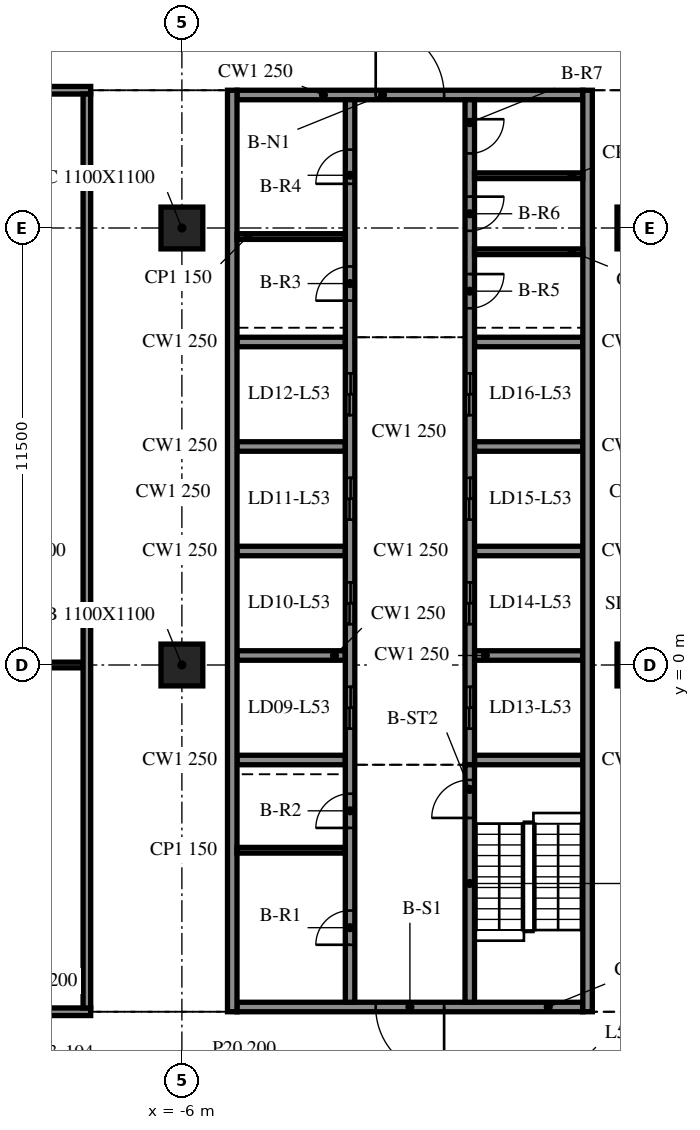
"""IFC4 building model, lengths in metres.
Left out: names, types, materials, properties, quantities, classifications, styles, units other than length and angle.
Written with IfcOpenShell. Run it as: python <this file> out.ifc"""

import sys

from ifc_helpers import new_model, si_unit, direction, frame, frame_2d, origin, origin_2d, place, context, subcontext, project, spatial, rectangle, extrude, element, fill, save


model = new_model("IFC4")
c1 = context("Model", 3, precision=1e-05, world=origin(), true_north=direction((0.0, 1.0)))
c2 = subcontext(c1, "Body", "Model", "MODEL_VIEW")
j1 = project(units=[si_unit("LENGTHUNIT", "METRE"), si_unit("PLANEANGLEUNIT", "RADIAN")], contexts=[c1])
p1 = place(None, origin())
s1 = spatial("IfcSite", under=j1, at=p1, CompositionType="ELEMENT")
p2 = place(p1, origin())
s2 = spatial("IfcBuilding", under=s1, at=p2, CompositionType="ELEMENT")
p3 = place(p2, frame((0.0, 0.0, 220.5)))
s3 = spatial("IfcBuildingStorey", under=s2, at=p3, CompositionType="ELEMENT", Elevation=220.5)
for number, where, z_axis, x_axis in (
    (1, (-6.0, 0.0, -0.34), (0.0, 0.0, 1.0), (1.0, 0.0, 0.0)),
    (2, (-6.0, 11.5, -0.34), (0.0, 0.0, 1.0), (1.0, 0.0, 0.0)),
    (3, (6.0, 0.0, -0.34), (0.0, 0.0, 1.0), (1.0, 0.0, 0.0)),
    (4, (6.0, 11.5, -0.34), (0.0, 0.0, 1.0), (1.0, 0.0, 0.0)),
):
    element("IfcColumn", number, at=place(p3, frame(where, z_axis=z_axis, x_axis=x_axis)), inside=s3, PredefinedType="COLUMN", context=c2, shape_type="SweptSolid", body=[
        extrude(rectangle(XDim=1.1, YDim=1.1, at=origin_2d()), origin(), (0.0, 0.0, 1.0), 3.74),
    ])
for number, where, z_axis, x_axis in (
    (5, (-4.675, 15.125, 0.0), (0.0, 0.0, 1.0), (0.0, -1.0, 0.0)),
    (6, (4.675, -9.125, 0.0), (0.0, 0.0, 1.0), (0.0, 1.0, 0.0)),
):
    element("IfcWall", number, at=place(p3, frame(where, z_axis=z_axis, x_axis=x_axis)), inside=s3, PredefinedType="SOLIDWALL", context=c2, shape_type="SweptSolid", body=[
        extrude(rectangle(XDim=24.25, YDim=0.25, at=frame_2d((12.125, 0.0))), origin(), (0.0, 0.0, 1.0), 3.4),
    ])
p4 = place(p3, frame((4.55, -9.0, 0.0), z_axis=(0.0, 0.0, 1.0), x_axis=(-1.0, 0.0, 0.0)))
e7 = element("IfcWall", 7, at=p4, inside=s3, PredefinedType="SOLIDWALL", context=c2, shape_type="SweptSolid", body=[
    extrude(rectangle(XDim=9.1, YDim=0.25, at=frame_2d((4.55, 0.0))), origin(), (0.0, 0.0, 1.0), 3.4),
])
p5 = place(p4, frame((3.65, 0.0, 0.0)))
e8 = element("IfcOpeningElement", 8, at=p5, cuts=e7, PredefinedType="OPENING", context=c2, shape_type="SweptSolid", body=[
    extrude(rectangle(XDim=1.8, YDim=2.1, at=frame_2d((0.9, 1.05))), frame((0.0, 0.135, 0.0), z_axis=(0.0, -1.0, 0.0), x_axis=(1.0, 0.0, 0.0)), (0.0, 0.0, 1.0), 0.27),
])
p6 = place(p3, frame((-4.55, 15.0, 0.0), z_axis=(0.0, 0.0, 1.0), x_axis=(1.0, 0.0, 0.0)))
e9 = element("IfcWall", 9, at=p6, inside=s3, PredefinedType="SOLIDWALL", context=c2, shape_type="SweptSolid", body=[
    extrude(rectangle(XDim=9.1, YDim=0.25, at=frame_2d((4.55, 0.0))), origin(), (0.0, 0.0, 1.0), 3.4),
])
p7 = place(p6, frame((3.65, 0.0, 0.0)))
e10 = element("IfcOpeningElement", 10, at=p7, cuts=e9, PredefinedType="OPENING", context=c2, shape_type="SweptSolid", body=[
    extrude(rectangle(XDim=1.8, YDim=2.1, at=frame_2d((0.9, 1.05))), frame((0.0, 0.135, 0.0), z_axis=(0.0, -1.0, 0.0), x_axis=(1.0, 0.0, 0.0)), (0.0, 0.0, 1.0), 0.27),
])
p8 = place(p3, frame((-1.575, -8.875, 0.0), z_axis=(0.0, 0.0, 1.0), x_axis=(0.0, 1.0, 0.0)))
e11 = element("IfcWall", 11, at=p8, inside=s3, PredefinedType="SOLIDWALL", context=c2, shape_type="SweptSolid", body=[
    extrude(rectangle(XDim=23.75, YDim=0.25, at=frame_2d((11.875, 0.0))), origin(), (0.0, 0.0, 1.0), 3.4),
])
p9 = place(p8, frame((7.2, 0.0, 0.0)))
e12 = element("IfcOpeningElement", 12, at=p9, cuts=e11, PredefinedType="OPENING", context=c2, shape_type="SweptSolid", body=[
    extrude(rectangle(XDim=1.1, YDim=2.1, at=frame_2d((0.55, 1.05))), frame((0.0, 0.135, 0.0), z_axis=(0.0, -1.0, 0.0), x_axis=(1.0, 0.0, 0.0)), (0.0, 0.0, 1.0), 0.27),
])
p10 = place(p8, frame((9.95, 0.0, 0.0)))
e13 = element("IfcOpeningElement", 13, at=p10, cuts=e11, PredefinedType="OPENING", context=c2, shape_type="SweptSolid", body=[
    extrude(rectangle(XDim=1.1, YDim=2.1, at=frame_2d((0.55, 1.05))), frame((0.0, 0.135, 0.0), z_axis=(0.0, -1.0, 0.0), x_axis=(1.0, 0.0, 0.0)), (0.0, 0.0, 1.0), 0.27),
])
p11 = place(p8, frame((12.7, 0.0, 0.0)))
e14 = element("IfcOpeningElement", 14, at=p11, cuts=e11, PredefinedType="OPENING", context=c2, shape_type="SweptSolid", body=[
    extrude(rectangle(XDim=1.1, YDim=2.1, at=frame_2d((0.55, 1.05))), frame((0.0, 0.135, 0.0), z_axis=(0.0, -1.0, 0.0), x_axis=(1.0, 0.0, 0.0)), (0.0, 0.0, 1.0), 0.27),
])
p12 = place(p8, frame((15.45, 0.0, 0.0)))
e15 = element("IfcOpeningElement", 15, at=p12, cuts=e11, PredefinedType="OPENING", context=c2, shape_type="SweptSolid", body=[
    extrude(rectangle(XDim=1.1, YDim=2.1, at=frame_2d((0.55, 1.05))), frame((0.0, 0.135, 0.0), z_axis=(0.0, -1.0, 0.0), x_axis=(1.0, 0.0, 0.0)), (0.0, 0.0, 1.0), 0.27),
])
p13 = place(p8, frame((1.512, 0.0, 0.0)))
e16 = element("IfcOpeningElement", 16, at=p13, cuts=e11, PredefinedType="OPENING", context=c2, shape_type="SweptSolid", body=[
    extrude(rectangle(XDim=0.9, YDim=2.1, at=frame_2d((0.45, 1.05))), frame((0.0, 0.135, 0.0), z_axis=(0.0, -1.0, 0.0), x_axis=(1.0, 0.0, 0.0)), (0.0, 0.0, 1.0), 0.27),
])
p14 = place(p8, frame((4.587, 0.0, 0.0)))
e17 = element("IfcOpeningElement", 17, at=p14, cuts=e11, PredefinedType="OPENING", context=c2, shape_type="SweptSolid", body=[
    extrude(rectangle(XDim=0.9, YDim=2.1, at=frame_2d((0.45, 1.05))), frame((0.0, 0.135, 0.0), z_axis=(0.0, -1.0, 0.0), x_axis=(1.0, 0.0, 0.0)), (0.0, 0.0, 1.0), 0.27),
])
p15 = place(p8, frame((18.462, 0.0, 0.0)))
e18 = element("IfcOpeningElement", 18, at=p15, cuts=e11, PredefinedType="OPENING", context=c2, shape_type="SweptSolid", body=[
    extrude(rectangle(XDim=0.9, YDim=2.1, at=frame_2d((0.45, 1.05))), frame((0.0, 0.135, 0.0), z_axis=(0.0, -1.0, 0.0), x_axis=(1.0, 0.0, 0.0)), (0.0, 0.0, 1.0), 0.27),
])
p16 = place(p8, frame((21.538, 0.0, 0.0)))
e19 = element("IfcOpeningElement", 19, at=p16, cuts=e11, PredefinedType="OPENING", context=c2, shape_type="SweptSolid", body=[
    extrude(rectangle(XDim=0.9, YDim=2.1, at=frame_2d((0.45, 1.05))), frame((0.0, 0.135, 0.0), z_axis=(0.0, -1.0, 0.0), x_axis=(1.0, 0.0, 0.0)), (0.0, 0.0, 1.0), 0.27),
])
p17 = place(p3, frame((1.575, -8.875, 0.0), z_axis=(0.0, 0.0, 1.0), x_axis=(0.0, 1.0, 0.0)))
e20 = element("IfcWall", 20, at=p17, inside=s3, PredefinedType="SOLIDWALL", context=c2, shape_type="SweptSolid", body=[
    extrude(rectangle(XDim=6.25, YDim=0.25, at=frame_2d((3.125, 0.0))), origin(), (0.0, 0.0, 1.0), 3.4),
])
p18 = place(p17, frame((4.85, 0.0, 0.0)))
e21 = element("IfcOpeningElement", 21, at=p18, cuts=e20, PredefinedType="OPENING", context=c2, shape_type="SweptSolid", body=[
    extrude(rectangle(XDim=1.0, YDim=2.1, at=frame_2d((0.5, 1.05))), frame((0.0, 0.135, 0.0), z_axis=(0.0, -1.0, 0.0), x_axis=(1.0, 0.0, 0.0)), (0.0, 0.0, 1.0), 0.27),
])
p19 = place(p3, frame((1.575, 14.875, 0.0), z_axis=(0.0, 0.0, 1.0), x_axis=(0.0, -1.0, 0.0)))
e22 = element("IfcWall", 22, at=p19, inside=s3, PredefinedType="SOLIDWALL", context=c2, shape_type="SweptSolid", body=[
    extrude(rectangle(XDim=17.5, YDim=0.25, at=frame_2d((8.75, 0.0))), origin(), (0.0, 0.0, 1.0), 3.4),
])
p20 = place(p19, frame((15.45, 0.0, 0.0)))
e23 = element("IfcOpeningElement", 23, at=p20, cuts=e22, PredefinedType="OPENING", context=c2, shape_type="SweptSolid", body=[
    extrude(rectangle(XDim=1.1, YDim=2.1, at=frame_2d((0.55, 1.05))), frame((0.0, 0.135, 0.0), z_axis=(0.0, -1.0, 0.0), x_axis=(1.0, 0.0, 0.0)), (0.0, 0.0, 1.0), 0.27),
])
p21 = place(p19, frame((12.7, 0.0, 0.0)))
e24 = element("IfcOpeningElement", 24, at=p21, cuts=e22, PredefinedType="OPENING", context=c2, shape_type="SweptSolid", body=[
    extrude(rectangle(XDim=1.1, YDim=2.1, at=frame_2d((0.55, 1.05))), frame((0.0, 0.135, 0.0), z_axis=(0.0, -1.0, 0.0), x_axis=(1.0, 0.0, 0.0)), (0.0, 0.0, 1.0), 0.27),
])
p22 = place(p19, frame((9.95, 0.0, 0.0)))
e25 = element("IfcOpeningElement", 25, at=p22, cuts=e22, PredefinedType="OPENING", context=c2, shape_type="SweptSolid", body=[
    extrude(rectangle(XDim=1.1, YDim=2.1, at=frame_2d((0.55, 1.05))), frame((0.0, 0.135, 0.0), z_axis=(0.0, -1.0, 0.0), x_axis=(1.0, 0.0, 0.0)), (0.0, 0.0, 1.0), 0.27),
])
p23 = place(p19, frame((7.2, 0.0, 0.0)))
e26 = element("IfcOpeningElement", 26, at=p23, cuts=e22, PredefinedType="OPENING", context=c2, shape_type="SweptSolid", body=[
    extrude(rectangle(XDim=1.1, YDim=2.1, at=frame_2d((0.55, 1.05))), frame((0.0, 0.135, 0.0), z_axis=(0.0, -1.0, 0.0), x_axis=(1.0, 0.0, 0.0)), (0.0, 0.0, 1.0), 0.27),
])
p24 = place(p19, frame((4.587, 0.0, 0.0)))
e27 = element("IfcOpeningElement", 27, at=p24, cuts=e22, PredefinedType="OPENING", context=c2, shape_type="SweptSolid", body=[
    extrude(rectangle(XDim=0.9, YDim=2.1, at=frame_2d((0.45, 1.05))), frame((0.0, 0.135, 0.0), z_axis=(0.0, -1.0, 0.0), x_axis=(1.0, 0.0, 0.0)), (0.0, 0.0, 1.0), 0.27),
])
p25 = place(p19, frame((2.55, 0.0, 0.0)))
e28 = element("IfcOpeningElement", 28, at=p25, cuts=e22, PredefinedType="OPENING", context=c2, shape_type="SweptSolid", body=[
    extrude(rectangle(XDim=0.9, YDim=2.1, at=frame_2d((0.45, 1.05))), frame((0.0, 0.135, 0.0), z_axis=(0.0, -1.0, 0.0), x_axis=(1.0, 0.0, 0.0)), (0.0, 0.0, 1.0), 0.27),
])
p26 = place(p19, frame((0.512, 0.0, 0.0)))
e29 = element("IfcOpeningElement", 29, at=p26, cuts=e22, PredefinedType="OPENING", context=c2, shape_type="SweptSolid", body=[
    extrude(rectangle(XDim=0.9, YDim=2.1, at=frame_2d((0.45, 1.05))), frame((0.0, 0.135, 0.0), z_axis=(0.0, -1.0, 0.0), x_axis=(1.0, 0.0, 0.0)), (0.0, 0.0, 1.0), 0.27),
])
for number, where, z_axis, x_axis in (
    (30, (-4.55, -2.5, 0.0), (0.0, 0.0, 1.0), (1.0, 0.0, 0.0)),
    (31, (-4.55, 0.25, 0.0), (0.0, 0.0, 1.0), (1.0, 0.0, 0.0)),
    (32, (-4.55, 3.0, 0.0), (0.0, 0.0, 1.0), (1.0, 0.0, 0.0)),
    (33, (-4.55, 5.75, 0.0), (0.0, 0.0, 1.0), (1.0, 0.0, 0.0)),
    (34, (-4.55, 8.5, 0.0), (0.0, 0.0, 1.0), (1.0, 0.0, 0.0)),
    (35, (1.7, -2.5, 0.0), (0.0, 0.0, 1.0), (1.0, 0.0, 0.0)),
    (36, (1.7, 0.25, 0.0), (0.0, 0.0, 1.0), (1.0, 0.0, 0.0)),
    (37, (1.7, 3.0, 0.0), (0.0, 0.0, 1.0), (1.0, 0.0, 0.0)),
    (38, (1.7, 5.75, 0.0), (0.0, 0.0, 1.0), (1.0, 0.0, 0.0)),
    (39, (1.7, 8.5, 0.0), (0.0, 0.0, 1.0), (1.0, 0.0, 0.0)),
):
    element("IfcWall", number, at=place(p3, frame(where, z_axis=z_axis, x_axis=x_axis)), inside=s3, PredefinedType="SOLIDWALL", context=c2, shape_type="SweptSolid", body=[
        extrude(rectangle(XDim=2.85, YDim=0.25, at=frame_2d((1.425, 0.0))), origin(), (0.0, 0.0, 1.0), 3.4),
    ])
for number, where, z_axis, x_axis in (
    (40, (-4.55, -4.875, 0.0), (0.0, 0.0, 1.0), (1.0, 0.0, 0.0)),
    (41, (-4.55, 11.275, 0.0), (0.0, 0.0, 1.0), (1.0, 0.0, 0.0)),
    (42, (1.7, 10.875, 0.0), (0.0, 0.0, 1.0), (1.0, 0.0, 0.0)),
    (43, (1.7, 12.875, 0.0), (0.0, 0.0, 1.0), (1.0, 0.0, 0.0)),
):
    element("IfcWall", number, at=place(p3, frame(where, z_axis=z_axis, x_axis=x_axis)), inside=s3, PredefinedType="PARTITIONING", context=c2, shape_type="SweptSolid", body=[
        extrude(rectangle(XDim=2.85, YDim=0.15, at=frame_2d((1.425, 0.0))), origin(), (0.0, 0.0, 1.0), 3.4),
    ])
p27 = place(p3, frame((-15.7, -9.125, 0.0), z_axis=(0.0, 0.0, 1.0), x_axis=(1.0, 0.0, 0.0)))
e44 = element("IfcWall", 44, at=p27, inside=s3, PredefinedType="PARTITIONING", context=c2, shape_type="SweptSolid", body=[
    extrude(rectangle(XDim=7.3, YDim=0.2, at=frame_2d((3.65, 0.0))), origin(), (0.0, 0.0, 1.0), 3.4),
])
p28 = place(p27, frame((3.1, 0.0, 0.0)))
e45 = element("IfcOpeningElement", 45, at=p28, cuts=e44, PredefinedType="OPENING", context=c2, shape_type="SweptSolid", body=[
    extrude(rectangle(XDim=0.9, YDim=2.1, at=frame_2d((0.45, 1.05))), frame((0.0, 0.11, 0.0), z_axis=(0.0, -1.0, 0.0), x_axis=(1.0, 0.0, 0.0)), (0.0, 0.0, 1.0), 0.22),
])
p29 = place(p3, frame((-15.5, 0.0, 0.0), z_axis=(0.0, 0.0, 1.0), x_axis=(1.0, 0.0, 0.0)))
e46 = element("IfcWall", 46, at=p29, inside=s3, PredefinedType="PARTITIONING", context=c2, shape_type="SweptSolid", body=[
    extrude(rectangle(XDim=6.9, YDim=0.15, at=frame_2d((3.45, 0.0))), origin(), (0.0, 0.0, 1.0), 3.4),
])
p30 = place(p3, frame((-15.7, 15.125, 0.0), z_axis=(0.0, 0.0, 1.0), x_axis=(1.0, 0.0, 0.0)))
e47 = element("IfcWall", 47, at=p30, inside=s3, PredefinedType="PARTITIONING", context=c2, shape_type="SweptSolid", body=[
    extrude(rectangle(XDim=7.3, YDim=0.2, at=frame_2d((3.65, 0.0))), origin(), (0.0, 0.0, 1.0), 3.4),
])
p31 = place(p3, frame((-8.5, -9.025, 0.0), z_axis=(0.0, 0.0, 1.0), x_axis=(0.0, 1.0, 0.0)))
e48 = element("IfcWall", 48, at=p31, inside=s3, PredefinedType="PARTITIONING", context=c2, shape_type="SweptSolid", body=[
    extrude(rectangle(XDim=24.05, YDim=0.2, at=frame_2d((12.025, 0.0))), origin(), (0.0, 0.0, 1.0), 3.4),
])
p32 = place(p5, origin())
e49 = element("IfcDoor", 49, at=p32, inside=s3, OperationType="DOUBLE_DOOR_SINGLE_SWING", PredefinedType="DOOR", context=c2, shape_type="SweptSolid", body=[
    extrude(rectangle(XDim=1.8, YDim=2.1, at=frame_2d((0.9, 1.05))), frame((0.0, 0.025, 0.0), z_axis=(0.0, -1.0, 0.0), x_axis=(1.0, 0.0, 0.0)), (0.0, 0.0, 1.0), 0.05),
])
fill(e8, e49)
p33 = place(p7, origin())
e50 = element("IfcDoor", 50, at=p33, inside=s3, OperationType="DOUBLE_DOOR_SINGLE_SWING", PredefinedType="DOOR", context=c2, shape_type="SweptSolid", body=[
    extrude(rectangle(XDim=1.8, YDim=2.1, at=frame_2d((0.9, 1.05))), frame((0.0, 0.025, 0.0), z_axis=(0.0, -1.0, 0.0), x_axis=(1.0, 0.0, 0.0)), (0.0, 0.0, 1.0), 0.05),
])
fill(e10, e50)
p34 = place(p20, origin())
e51 = element("IfcDoor", 51, at=p34, inside=s3, OperationType="DOUBLE_DOOR_SLIDING", PredefinedType="DOOR", context=c2, shape_type="SweptSolid", body=[
    extrude(rectangle(XDim=1.1, YDim=2.1, at=frame_2d((0.55, 1.05))), frame((0.0, 0.025, 0.0), z_axis=(0.0, -1.0, 0.0), x_axis=(1.0, 0.0, 0.0)), (0.0, 0.0, 1.0), 0.05),
])
fill(e23, e51)
p35 = place(p21, origin())
e52 = element("IfcDoor", 52, at=p35, inside=s3, OperationType="DOUBLE_DOOR_SLIDING", PredefinedType="DOOR", context=c2, shape_type="SweptSolid", body=[
    extrude(rectangle(XDim=1.1, YDim=2.1, at=frame_2d((0.55, 1.05))), frame((0.0, 0.025, 0.0), z_axis=(0.0, -1.0, 0.0), x_axis=(1.0, 0.0, 0.0)), (0.0, 0.0, 1.0), 0.05),
])
fill(e24, e52)
p36 = place(p22, origin())
e53 = element("IfcDoor", 53, at=p36, inside=s3, OperationType="DOUBLE_DOOR_SLIDING", PredefinedType="DOOR", context=c2, shape_type="SweptSolid", body=[
    extrude(rectangle(XDim=1.1, YDim=2.1, at=frame_2d((0.55, 1.05))), frame((0.0, 0.025, 0.0), z_axis=(0.0, -1.0, 0.0), x_axis=(1.0, 0.0, 0.0)), (0.0, 0.0, 1.0), 0.05),
])
fill(e25, e53)
p37 = place(p23, origin())
e54 = element("IfcDoor", 54, at=p37, inside=s3, OperationType="DOUBLE_DOOR_SLIDING", PredefinedType="DOOR", context=c2, shape_type="SweptSolid", body=[
    extrude(rectangle(XDim=1.1, YDim=2.1, at=frame_2d((0.55, 1.05))), frame((0.0, 0.025, 0.0), z_axis=(0.0, -1.0, 0.0), x_axis=(1.0, 0.0, 0.0)), (0.0, 0.0, 1.0), 0.05),
])
fill(e26, e54)
p38 = place(p9, origin())
e55 = element("IfcDoor", 55, at=p38, inside=s3, OperationType="DOUBLE_DOOR_SLIDING", PredefinedType="DOOR", context=c2, shape_type="SweptSolid", body=[
    extrude(rectangle(XDim=1.1, YDim=2.1, at=frame_2d((0.55, 1.05))), frame((0.0, 0.025, 0.0), z_axis=(0.0, -1.0, 0.0), x_axis=(1.0, 0.0, 0.0)), (0.0, 0.0, 1.0), 0.05),
])
fill(e12, e55)
p39 = place(p10, origin())
e56 = element("IfcDoor", 56, at=p39, inside=s3, OperationType="DOUBLE_DOOR_SLIDING", PredefinedType="DOOR", context=c2, shape_type="SweptSolid", body=[
    extrude(rectangle(XDim=1.1, YDim=2.1, at=frame_2d((0.55, 1.05))), frame((0.0, 0.025, 0.0), z_axis=(0.0, -1.0, 0.0), x_axis=(1.0, 0.0, 0.0)), (0.0, 0.0, 1.0), 0.05),
])
fill(e13, e56)
p40 = place(p11, origin())
e57 = element("IfcDoor", 57, at=p40, inside=s3, OperationType="DOUBLE_DOOR_SLIDING", PredefinedType="DOOR", context=c2, shape_type="SweptSolid", body=[
    extrude(rectangle(XDim=1.1, YDim=2.1, at=frame_2d((0.55, 1.05))), frame((0.0, 0.025, 0.0), z_axis=(0.0, -1.0, 0.0), x_axis=(1.0, 0.0, 0.0)), (0.0, 0.0, 1.0), 0.05),
])
fill(e14, e57)
p41 = place(p12, origin())
e58 = element("IfcDoor", 58, at=p41, inside=s3, OperationType="DOUBLE_DOOR_SLIDING", PredefinedType="DOOR", context=c2, shape_type="SweptSolid", body=[
    extrude(rectangle(XDim=1.1, YDim=2.1, at=frame_2d((0.55, 1.05))), frame((0.0, 0.025, 0.0), z_axis=(0.0, -1.0, 0.0), x_axis=(1.0, 0.0, 0.0)), (0.0, 0.0, 1.0), 0.05),
])
fill(e15, e58)
p42 = place(p13, origin())
e59 = element("IfcDoor", 59, at=p42, inside=s3, OperationType="SINGLE_SWING_LEFT", PredefinedType="DOOR", context=c2, shape_type="SweptSolid", body=[
    extrude(rectangle(XDim=0.9, YDim=2.1, at=frame_2d((0.45, 1.05))), frame((0.0, 0.025, 0.0), z_axis=(0.0, -1.0, 0.0), x_axis=(1.0, 0.0, 0.0)), (0.0, 0.0, 1.0), 0.05),
])
fill(e16, e59)
p43 = place(p14, origin())
e60 = element("IfcDoor", 60, at=p43, inside=s3, OperationType="SINGLE_SWING_RIGHT", PredefinedType="DOOR", context=c2, shape_type="SweptSolid", body=[
    extrude(rectangle(XDim=0.9, YDim=2.1, at=frame_2d((0.45, 1.05))), frame((0.0, 0.025, 0.0), z_axis=(0.0, -1.0, 0.0), x_axis=(1.0, 0.0, 0.0)), (0.0, 0.0, 1.0), 0.05),
])
fill(e17, e60)
p44 = place(p15, origin())
e61 = element("IfcDoor", 61, at=p44, inside=s3, OperationType="SINGLE_SWING_LEFT", PredefinedType="DOOR", context=c2, shape_type="SweptSolid", body=[
    extrude(rectangle(XDim=0.9, YDim=2.1, at=frame_2d((0.45, 1.05))), frame((0.0, 0.025, 0.0), z_axis=(0.0, -1.0, 0.0), x_axis=(1.0, 0.0, 0.0)), (0.0, 0.0, 1.0), 0.05),
])
fill(e18, e61)
p45 = place(p16, origin())
e62 = element("IfcDoor", 62, at=p45, inside=s3, OperationType="SINGLE_SWING_RIGHT", PredefinedType="DOOR", context=c2, shape_type="SweptSolid", body=[
    extrude(rectangle(XDim=0.9, YDim=2.1, at=frame_2d((0.45, 1.05))), frame((0.0, 0.025, 0.0), z_axis=(0.0, -1.0, 0.0), x_axis=(1.0, 0.0, 0.0)), (0.0, 0.0, 1.0), 0.05),
])
fill(e19, e62)
p46 = place(p24, origin())
e63 = element("IfcDoor", 63, at=p46, inside=s3, OperationType="SINGLE_SWING_LEFT", PredefinedType="DOOR", context=c2, shape_type="SweptSolid", body=[
    extrude(rectangle(XDim=0.9, YDim=2.1, at=frame_2d((0.45, 1.05))), frame((0.0, 0.025, 0.0), z_axis=(0.0, -1.0, 0.0), x_axis=(1.0, 0.0, 0.0)), (0.0, 0.0, 1.0), 0.05),
])
fill(e27, e63)
p47 = place(p25, origin())
e64 = element("IfcDoor", 64, at=p47, inside=s3, OperationType="SINGLE_SWING_RIGHT", PredefinedType="DOOR", context=c2, shape_type="SweptSolid", body=[
    extrude(rectangle(XDim=0.9, YDim=2.1, at=frame_2d((0.45, 1.05))), frame((0.0, 0.025, 0.0), z_axis=(0.0, -1.0, 0.0), x_axis=(1.0, 0.0, 0.0)), (0.0, 0.0, 1.0), 0.05),
])
fill(e28, e64)
p48 = place(p26, origin())
e65 = element("IfcDoor", 65, at=p48, inside=s3, OperationType="SINGLE_SWING_LEFT", PredefinedType="DOOR", context=c2, shape_type="SweptSolid", body=[
    extrude(rectangle(XDim=0.9, YDim=2.1, at=frame_2d((0.45, 1.05))), frame((0.0, 0.025, 0.0), z_axis=(0.0, -1.0, 0.0), x_axis=(1.0, 0.0, 0.0)), (0.0, 0.0, 1.0), 0.05),
])
fill(e29, e65)
p49 = place(p18, origin())
e66 = element("IfcDoor", 66, at=p49, inside=s3, OperationType="SINGLE_SWING_RIGHT", PredefinedType="DOOR", context=c2, shape_type="SweptSolid", body=[
    extrude(rectangle(XDim=1.0, YDim=2.1, at=frame_2d((0.5, 1.05))), frame((0.0, 0.025, 0.0), z_axis=(0.0, -1.0, 0.0), x_axis=(1.0, 0.0, 0.0)), (0.0, 0.0, 1.0), 0.05),
])
fill(e21, e66)
save(model, sys.argv[1])
